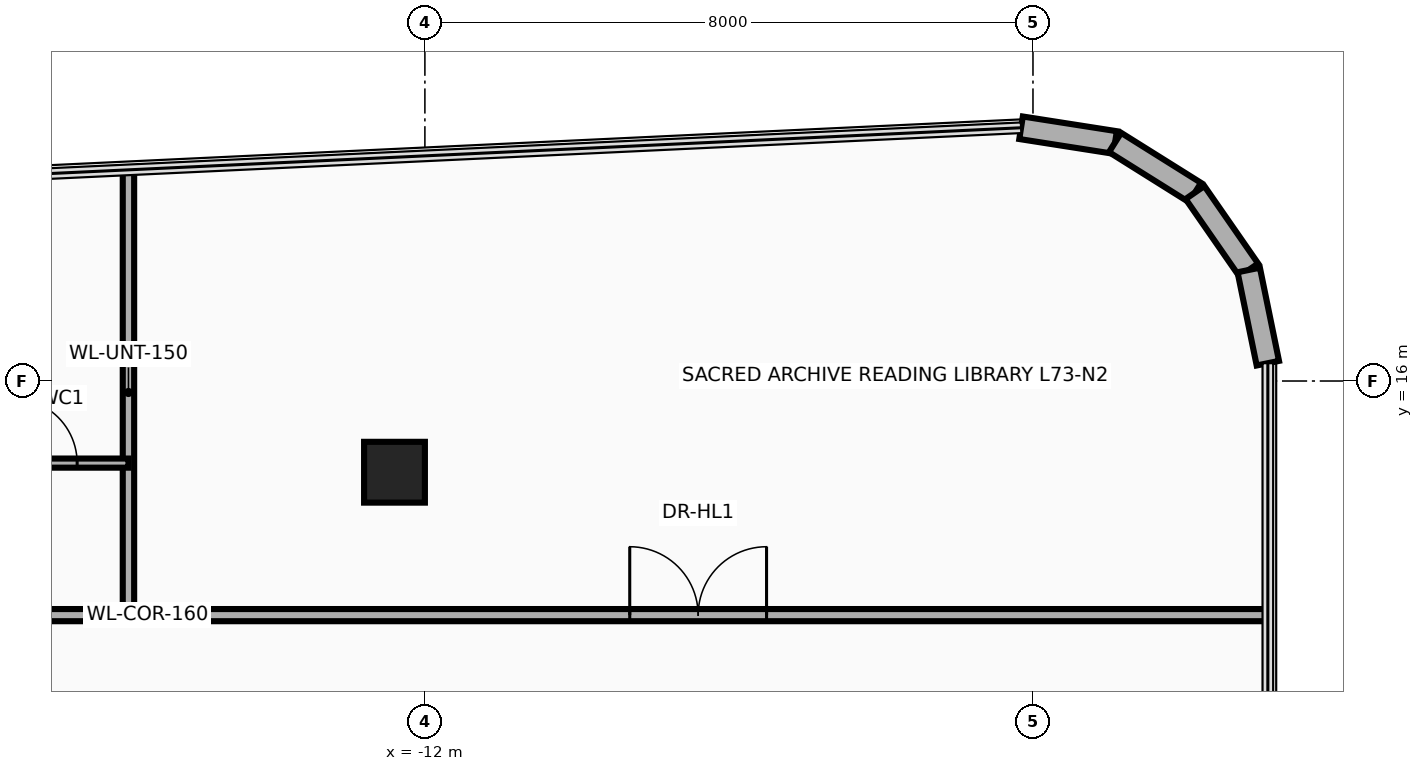
"""IFC4 building model, lengths in metres.
Left out: names, types, materials, properties, quantities, classifications, styles, units other than length and angle.
Written with IfcOpenShell. Run it as: python <this file> out.ifc"""

import sys

from ifc_helpers import new_model, si_unit, direction, frame, frame_2d, origin, origin_2d, place, context, subcontext, project, spatial, rectangle, extrude, source, transform, mapped, element, fill, save


model = new_model("IFC4")
c1 = context("Model", 3, precision=1e-05, world=origin(), true_north=direction((0.0, 1.0)))
c2 = subcontext(c1, "Body", "Model", "MODEL_VIEW")
j1 = project(units=[si_unit("LENGTHUNIT", "METRE"), si_unit("PLANEANGLEUNIT", "RADIAN")], contexts=[c1])
p1 = place(None, origin())
s1 = spatial("IfcSite", under=j1, at=p1, CompositionType="ELEMENT")
p2 = place(p1, origin())
s2 = spatial("IfcBuilding", under=s1, at=p2, CompositionType="ELEMENT")
p3 = place(p2, frame((0.0, 0.0, 280.0)))
s3 = spatial("IfcBuildingStorey", under=s2, at=p3, CompositionType="ELEMENT", Elevation=280.0)
m1 = source(origin(), c2, "Body", "SweptSolid", [
    extrude(rectangle(XDim=0.8, YDim=0.8, at=origin_2d()), origin(), (0.0, 0.0, 1.0), 3.5),
])
p4 = place(p3, frame((-12.4, 14.8, 0.0), z_axis=(0.0, 0.0, 1.0), x_axis=(1.0, 0.0, 0.0)))
e1 = element("IfcColumn", 1, at=p4, inside=s3, PredefinedType="COLUMN", context=c2, shape_type="MappedRepresentation", body=[
    mapped(m1, transform((0.0, 0.0, 0.0), x_axis=(1.0, 0.0, 0.0), y_axis=(0.0, 1.0, 0.0), z_axis=(0.0, 0.0, 1.0), scale=1.0)),
])
p5 = place(p3, frame((-4.157, 19.332, 0.0), z_axis=(0.0, 0.0, 1.0), x_axis=(0.987969236552, -0.15465053387, 0.0)))
e2 = element("IfcWall", 2, at=p5, inside=s3, PredefinedType="SOLIDWALL", context=c2, shape_type="SweptSolid", body=[
    extrude(rectangle(XDim=1.252, YDim=0.3, at=frame_2d((0.626, 0.0))), origin(), (0.0, 0.0, 1.0), 3.26),
])
for number, where, z_axis, x_axis in (
    (3, (-2.92, 19.138, 0.0), (0.0, 0.0, 1.0), (0.847, -0.531, 0.0)),
    (4, (-1.869, 18.48, 0.0), (0.0, 0.0, 1.0), (0.57, -0.822, 0.0)),
):
    element("IfcWall", number, at=place(p3, frame(where, z_axis=z_axis, x_axis=x_axis)), inside=s3, PredefinedType="SOLIDWALL", context=c2, shape_type="SweptSolid", body=[
        extrude(rectangle(XDim=1.24, YDim=0.3, at=frame_2d((0.62, 0.0))), origin(), (0.0, 0.0, 1.0), 3.26),
    ])
p6 = place(p3, frame((-1.161, 17.461, 0.0), z_axis=(0.0, 0.0, 1.0), x_axis=(0.20087696073, -0.979616479367, 0.0)))
e5 = element("IfcWall", 5, at=p6, inside=s3, PredefinedType="SOLIDWALL", context=c2, shape_type="SweptSolid", body=[
    extrude(rectangle(XDim=1.252, YDim=0.3, at=frame_2d((0.626, 0.0))), origin(), (0.0, 0.0, 1.0), 3.26),
])
p7 = place(p3, frame((-30.39, 12.92, 0.0), z_axis=(0.0, 0.0, 1.0), x_axis=(1.0, 0.0, 0.0)))
e6 = element("IfcWall", 6, at=p7, inside=s3, PredefinedType="PARTITIONING", context=c2, shape_type="SweptSolid", body=[
    extrude(rectangle(XDim=29.48, YDim=0.16, at=frame_2d((14.74, 0.0))), origin(), (0.0, 0.0, 1.0), 2.634),
])
p8 = place(p7, frame((3.148, 0.0, 0.0)))
e7 = element("IfcOpeningElement", 7, at=p8, cuts=e6, PredefinedType="OPENING", context=c2, shape_type="SweptSolid", body=[
    extrude(rectangle(XDim=0.95, YDim=2.15, at=frame_2d((0.475, 1.075))), frame((0.0, 0.095, 0.0), z_axis=(0.0, -1.0, 0.0), x_axis=(1.0, 0.0, 0.0)), (0.0, 0.0, 1.0), 0.19),
])
p9 = place(p7, frame((9.293, 0.0, 0.0)))
e8 = element("IfcOpeningElement", 8, at=p9, cuts=e6, PredefinedType="OPENING", context=c2, shape_type="SweptSolid", body=[
    extrude(rectangle(XDim=0.95, YDim=2.15, at=frame_2d((0.475, 1.075))), frame((0.0, 0.095, 0.0), z_axis=(0.0, -1.0, 0.0), x_axis=(1.0, 0.0, 0.0)), (0.0, 0.0, 1.0), 0.19),
])
p10 = place(p7, frame((21.085, 0.0, 0.0)))
e9 = element("IfcOpeningElement", 9, at=p10, cuts=e6, PredefinedType="OPENING", context=c2, shape_type="SweptSolid", body=[
    extrude(rectangle(XDim=1.8, YDim=2.15, at=frame_2d((0.9, 1.075))), frame((0.0, 0.095, 0.0), z_axis=(0.0, -1.0, 0.0), x_axis=(1.0, 0.0, 0.0)), (0.0, 0.0, 1.0), 0.19),
])
p11 = place(p3, frame((-15.9, 12.92, 0.0), z_axis=(0.0, 0.0, 1.0), x_axis=(0.0, 1.0, 0.0)))
e10 = element("IfcWall", 10, at=p11, inside=s3, PredefinedType="PARTITIONING", context=c2, shape_type="SweptSolid", body=[
    extrude(rectangle(XDim=5.858, YDim=0.15, at=frame_2d((2.929, 0.0))), origin(), (0.0, 0.0, 1.0), 2.623),
])
p12 = place(p3, frame((-18.1, 14.92, 0.0), z_axis=(0.0, 0.0, 1.0), x_axis=(1.0, 0.0, 0.0)))
e11 = element("IfcWall", 11, at=p12, inside=s3, PredefinedType="PARTITIONING", context=c2, shape_type="SweptSolid", body=[
    extrude(rectangle(XDim=2.2, YDim=0.12, at=frame_2d((1.1, 0.0))), origin(), (0.0, 0.0, 1.0), 2.623),
])
p13 = place(p12, frame((0.675, 0.0, 0.0)))
e12 = element("IfcOpeningElement", 12, at=p13, cuts=e11, PredefinedType="OPENING", context=c2, shape_type="SweptSolid", body=[
    extrude(rectangle(XDim=0.85, YDim=2.1, at=frame_2d((0.425, 1.05))), frame((0.0, 0.075, 0.0), z_axis=(0.0, -1.0, 0.0), x_axis=(1.0, 0.0, 0.0)), (0.0, 0.0, 1.0), 0.15),
])
p14 = place(p13, origin())
e13 = element("IfcDoor", 13, at=p14, inside=s3, OperationType="SINGLE_SWING_LEFT", PredefinedType="DOOR", context=c2, shape_type="SweptSolid", body=[
    extrude(rectangle(XDim=0.85, YDim=2.1, at=frame_2d((0.425, 1.05))), frame((0.0, 0.025, 0.0), z_axis=(0.0, -1.0, 0.0), x_axis=(1.0, 0.0, 0.0)), (0.0, 0.0, 1.0), 0.05),
])
fill(e12, e13)
p15 = place(p10, origin())
e14 = element("IfcDoor", 14, at=p15, inside=s3, OperationType="DOUBLE_DOOR_SINGLE_SWING", PredefinedType="DOOR", context=c2, shape_type="SweptSolid", body=[
    extrude(rectangle(XDim=1.8, YDim=2.15, at=frame_2d((0.9, 1.075))), frame((0.0, 0.025, 0.0), z_axis=(0.0, -1.0, 0.0), x_axis=(1.0, 0.0, 0.0)), (0.0, 0.0, 1.0), 0.05),
])
fill(e9, e14)
save(model, sys.argv[1])
